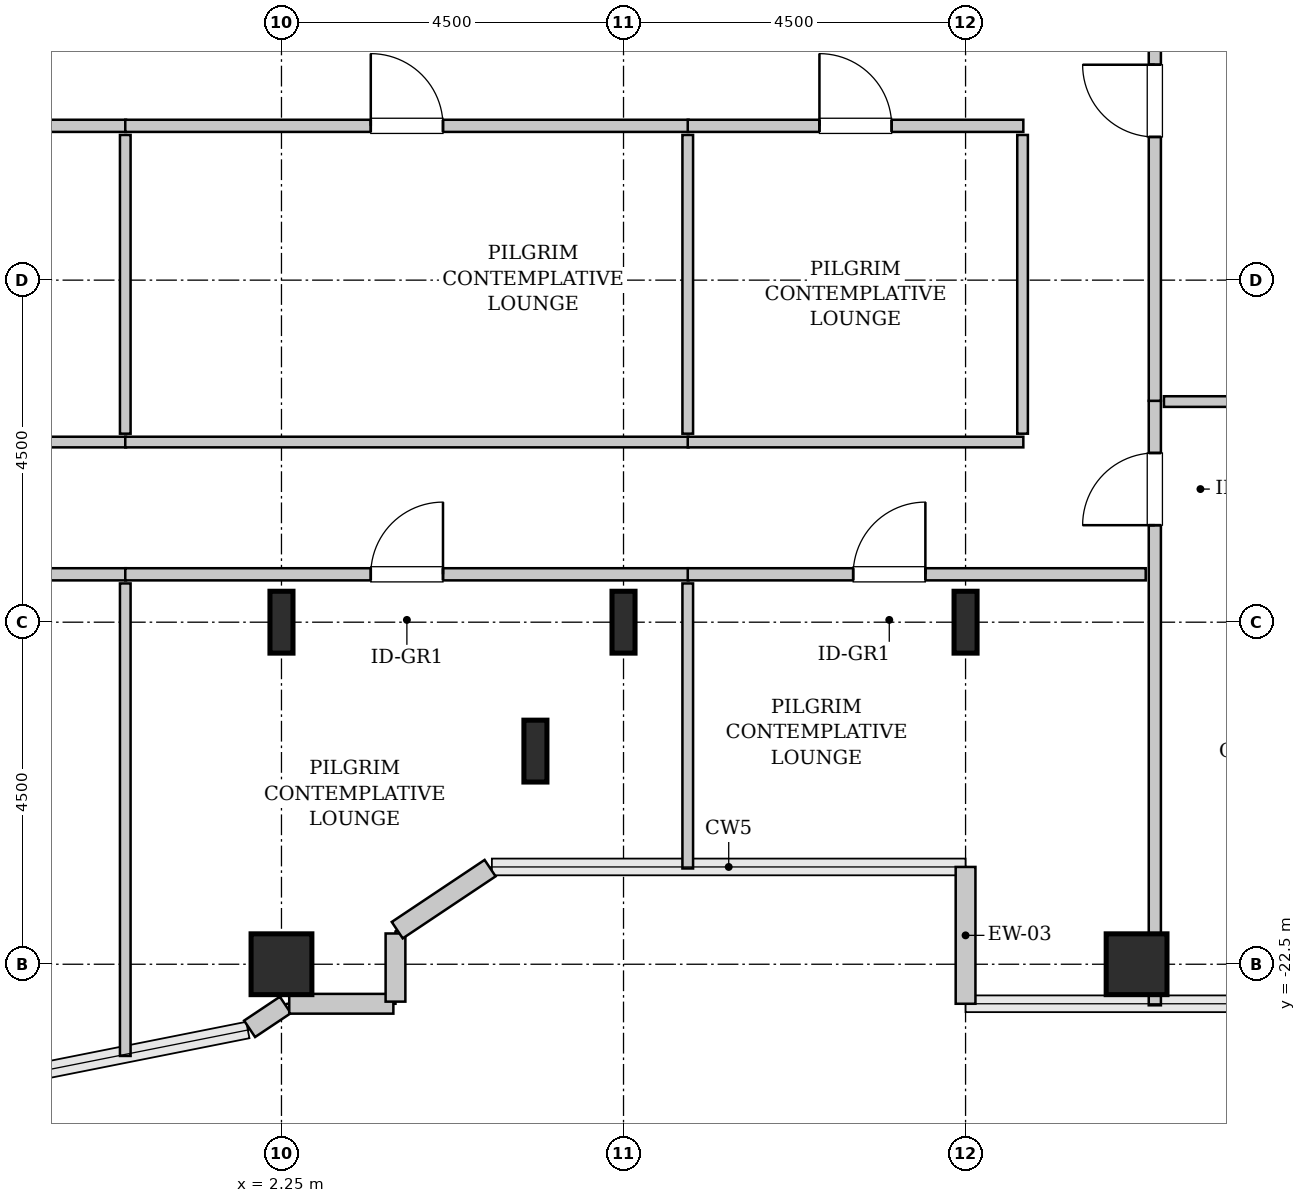
"""IFC4 building model, lengths in metres.
Left out: names, types, materials, properties, quantities, classifications, styles, units other than length and angle.
Written with IfcOpenShell. Run it as: python <this file> out.ifc"""

import sys

from ifc_helpers import new_model, si_unit, direction, frame, frame_2d, origin, origin_2d, place, context, subcontext, project, spatial, rectangle, hollow_rectangle, i_section, extrude, source, transform, mapped, element, fill, save


model = new_model("IFC4")
c1 = context("Model", 3, precision=1e-05, world=origin(), true_north=direction((0.0, 1.0)))
c2 = subcontext(c1, "Body", "Model", "MODEL_VIEW")
j1 = project(units=[si_unit("LENGTHUNIT", "METRE"), si_unit("PLANEANGLEUNIT", "RADIAN")], contexts=[c1])
p1 = place(None, origin())
s1 = spatial("IfcSite", under=j1, at=p1, CompositionType="ELEMENT")
p2 = place(p1, origin())
s2 = spatial("IfcBuilding", under=s1, at=p2, CompositionType="ELEMENT")
p3 = place(p2, frame((0.0, 0.0, 167.8)))
s3 = spatial("IfcBuildingStorey", under=s2, at=p3, CompositionType="ELEMENT", Elevation=167.8)
m1 = source(origin(), c2, "Body", "SweptSolid", [
    extrude(hollow_rectangle(XDim=0.8, YDim=0.8, WallThickness=0.04, InnerFilletRadius=0.04, OuterFilletRadius=0.08, at=origin_2d()), origin(), (0.0, 0.0, 1.0), 3.8),
])
p4 = place(p3, frame((2.25, -22.5, 0.0), z_axis=(0.0, 0.0, 1.0), x_axis=(1.0, 0.0, 0.0)))
e1 = element("IfcColumn", 1, at=p4, inside=s3, PredefinedType="COLUMN", context=c2, shape_type="MappedRepresentation", body=[
    mapped(m1, transform((0.0, 0.0, 0.0), x_axis=(1.0, 0.0, 0.0), y_axis=(0.0, 1.0, 0.0), z_axis=(0.0, 0.0, 1.0), scale=1.0)),
])
m2 = source(origin(), c2, "Body", "SweptSolid", [
    extrude(i_section(OverallWidth=0.303, OverallDepth=0.814, WebThickness=0.021, FlangeThickness=0.04, FilletRadius=0.03, at=origin_2d()), origin(), (0.0, 0.0, 1.0), 3.8),
])
for number, where, z_axis, x_axis in (
    (2, (2.25, -18.0, 0.0), (0.0, 0.0, 1.0), (1.0, 0.0, 0.0)),
    (3, (5.591, -19.696, 0.0), (0.0, 0.0, 1.0), (1.0, 0.0, 0.0)),
    (4, (6.75, -18.0, 0.0), (0.0, 0.0, 1.0), (1.0, 0.0, 0.0)),
    (5, (11.25, -18.0, 0.0), (0.0, 0.0, 1.0), (1.0, 0.0, 0.0)),
):
    element("IfcColumn", number, at=place(p3, frame(where, z_axis=z_axis, x_axis=x_axis)), inside=s3, PredefinedType="COLUMN", context=c2, shape_type="MappedRepresentation", body=[
        mapped(m2, transform((0.0, 0.0, 0.0), x_axis=(1.0, 0.0, 0.0), y_axis=(0.0, 1.0, 0.0), z_axis=(0.0, 0.0, 1.0), scale=1.0)),
    ])
p5 = place(p3, frame((13.5, -22.5, 0.0), z_axis=(0.0, 0.0, 1.0), x_axis=(1.0, 0.0, 0.0)))
e6 = element("IfcColumn", 6, at=p5, inside=s3, PredefinedType="COLUMN", context=c2, shape_type="MappedRepresentation", body=[
    mapped(m1, transform((0.0, 0.0, 0.0), x_axis=(1.0, 0.0, 0.0), y_axis=(0.0, 1.0, 0.0), z_axis=(0.0, 0.0, 1.0), scale=1.0)),
])
m3 = source(origin(), c2, "Body", "SweptSolid", [
    extrude(rectangle(XDim=1.8, YDim=0.26, at=frame_2d((0.9, 0.0))), origin(), (0.0, 0.0, 1.0), 3.55),
])
p6 = place(p3, frame((11.25, -21.22, 0.0), z_axis=(0.0, 0.0, 1.0), x_axis=(0.0, -1.0, 0.0)))
e7 = element("IfcWall", 7, at=p6, inside=s3, PredefinedType="SOLIDWALL", context=c2, shape_type="MappedRepresentation", body=[
    mapped(m3, transform((0.0, 0.0, 0.0), x_axis=(1.0, 0.0, 0.0), y_axis=(0.0, 1.0, 0.0), z_axis=(0.0, 0.0, 1.0), scale=1.0)),
])
m4 = source(origin(), c2, "Body", "SweptSolid", [
    extrude(rectangle(XDim=0.565, YDim=0.26, at=frame_2d((0.283, 0.0))), origin(), (0.0, 0.0, 1.0), 3.55),
])
p7 = place(p3, frame((1.831, -23.35, 0.0), z_axis=(0.0, 0.0, 1.0), x_axis=(0.831651492666, 0.555297933317, 0.0)))
e8 = element("IfcWall", 8, at=p7, inside=s3, PredefinedType="SOLIDWALL", context=c2, shape_type="MappedRepresentation", body=[
    mapped(m4, transform((0.0, 0.0, 0.0), x_axis=(1.0, 0.0, 0.0), y_axis=(0.0, 1.0, 0.0), z_axis=(0.0, 0.0, 1.0), scale=1.0)),
])
m5 = source(origin(), c2, "Body", "SweptSolid", [
    extrude(rectangle(XDim=1.37, YDim=0.26, at=frame_2d((0.685, 0.0))), origin(), (0.0, 0.0, 1.0), 3.55),
])
p8 = place(p3, frame((2.352, -23.02, 0.0), z_axis=(0.0, 0.0, 1.0), x_axis=(1.0, 0.0, 0.0)))
e9 = element("IfcWall", 9, at=p8, inside=s3, PredefinedType="SOLIDWALL", context=c2, shape_type="MappedRepresentation", body=[
    mapped(m5, transform((0.0, 0.0, 0.0), x_axis=(1.0, 0.0, 0.0), y_axis=(0.0, 1.0, 0.0), z_axis=(0.0, 0.0, 1.0), scale=1.0)),
])
m6 = source(origin(), c2, "Body", "SweptSolid", [
    extrude(rectangle(XDim=0.897, YDim=0.26, at=frame_2d((0.448, 0.0))), origin(), (0.0, 0.0, 1.0), 3.55),
])
p9 = place(p3, frame((3.75, -22.992, 0.0), z_axis=(0.0, 0.0, 1.0), x_axis=(0.0, 1.0, 0.0)))
e10 = element("IfcWall", 10, at=p9, inside=s3, PredefinedType="SOLIDWALL", context=c2, shape_type="MappedRepresentation", body=[
    mapped(m6, transform((0.0, 0.0, 0.0), x_axis=(1.0, 0.0, 0.0), y_axis=(0.0, 1.0, 0.0), z_axis=(0.0, 0.0, 1.0), scale=1.0)),
])
m7 = source(origin(), c2, "Body", "SweptSolid", [
    extrude(rectangle(XDim=1.469, YDim=0.26, at=frame_2d((0.734, 0.0))), origin(), (0.0, 0.0, 1.0), 3.55),
])
p10 = place(p3, frame((3.773, -22.052, 0.0), z_axis=(0.0, 0.0, 1.0), x_axis=(0.831461760506, 0.555581983884, 0.0)))
e11 = element("IfcWall", 11, at=p10, inside=s3, PredefinedType="SOLIDWALL", context=c2, shape_type="MappedRepresentation", body=[
    mapped(m7, transform((0.0, 0.0, 0.0), x_axis=(1.0, 0.0, 0.0), y_axis=(0.0, 1.0, 0.0), z_axis=(0.0, 0.0, 1.0), scale=1.0)),
])
m8 = source(origin(), c2, "Body", "SweptSolid", [
    extrude(rectangle(XDim=7.953, YDim=0.16, at=frame_2d((3.976, 0.0))), origin(), (0.0, 0.0, 1.0), 3.535),
])
p11 = place(p3, frame((13.74, -23.04, 0.0), z_axis=(0.0, 0.0, 1.0), x_axis=(0.0, 1.0, 0.0)))
e12 = element("IfcWall", 12, at=p11, inside=s3, PredefinedType="PARTITIONING", context=c2, shape_type="MappedRepresentation", body=[
    mapped(m8, transform((0.0, 0.0, 0.0), x_axis=(1.0, 0.0, 0.0), y_axis=(0.0, 1.0, 0.0), z_axis=(0.0, 0.0, 1.0), scale=1.0)),
])
p12 = place(p11, frame((6.316, 0.0, 0.0)))
e13 = element("IfcOpeningElement", 13, at=p12, cuts=e12, PredefinedType="OPENING", context=c2, shape_type="SweptSolid", body=[
    extrude(rectangle(XDim=0.95, YDim=2.1, at=frame_2d((0.475, 1.05))), frame((0.0, 0.09, 0.0), z_axis=(0.0, -1.0, 0.0), x_axis=(1.0, 0.0, 0.0)), (0.0, 0.0, 1.0), 0.18),
])
m9 = source(origin(), c2, "Body", "SweptSolid", [
    extrude(rectangle(XDim=11.43, YDim=0.14, at=frame_2d((5.715, 0.0))), origin(), (0.0, 0.0, 1.0), 3.535),
])
p13 = place(p3, frame((13.86, -15.097, 0.0), z_axis=(0.0, 0.0, 1.0), x_axis=(1.0, 0.0, 0.0)))
e14 = element("IfcWall", 14, at=p13, inside=s3, PredefinedType="PARTITIONING", context=c2, shape_type="MappedRepresentation", body=[
    mapped(m9, transform((0.0, 0.0, 0.0), x_axis=(1.0, 0.0, 0.0), y_axis=(0.0, 1.0, 0.0), z_axis=(0.0, 0.0, 1.0), scale=1.0)),
])
m10 = source(origin(), c2, "Body", "SweptSolid", [
    extrude(rectangle(XDim=7.892, YDim=0.16, at=frame_2d((3.946, 0.0))), origin(), (0.0, 0.0, 1.0), 3.535),
])
p14 = place(p3, frame((13.74, -15.087, 0.0), z_axis=(0.0, 0.0, 1.0), x_axis=(0.0, 1.0, 0.0)))
e15 = element("IfcWall", 15, at=p14, inside=s3, PredefinedType="PARTITIONING", context=c2, shape_type="MappedRepresentation", body=[
    mapped(m10, transform((0.0, 0.0, 0.0), x_axis=(1.0, 0.0, 0.0), y_axis=(0.0, 1.0, 0.0), z_axis=(0.0, 0.0, 1.0), scale=1.0)),
])
p15 = place(p14, frame((3.471, 0.0, 0.0)))
e16 = element("IfcOpeningElement", 16, at=p15, cuts=e15, PredefinedType="OPENING", context=c2, shape_type="SweptSolid", body=[
    extrude(rectangle(XDim=0.95, YDim=2.1, at=frame_2d((0.475, 1.05))), frame((0.0, 0.09, 0.0), z_axis=(0.0, -1.0, 0.0), x_axis=(1.0, 0.0, 0.0)), (0.0, 0.0, 1.0), 0.18),
])
m11 = source(origin(), c2, "Body", "SweptSolid", [
    extrude(rectangle(XDim=8.81, YDim=0.16, at=frame_2d((4.405, 0.0))), origin(), (0.0, 0.0, 1.0), 3.535),
])
p16 = place(p3, frame((-8.605, -17.37, 0.0), z_axis=(0.0, 0.0, 1.0), x_axis=(1.0, 0.0, 0.0)))
e17 = element("IfcWall", 17, at=p16, inside=s3, PredefinedType="PARTITIONING", context=c2, shape_type="MappedRepresentation", body=[
    mapped(m11, transform((0.0, 0.0, 0.0), x_axis=(1.0, 0.0, 0.0), y_axis=(0.0, 1.0, 0.0), z_axis=(0.0, 0.0, 1.0), scale=1.0)),
])
p17 = place(p16, frame((3.93, 0.0, 0.0)))
e18 = element("IfcOpeningElement", 18, at=p17, cuts=e17, PredefinedType="OPENING", context=c2, shape_type="SweptSolid", body=[
    extrude(rectangle(XDim=0.95, YDim=2.1, at=frame_2d((0.475, 1.05))), frame((0.0, 0.09, 0.0), z_axis=(0.0, -1.0, 0.0), x_axis=(1.0, 0.0, 0.0)), (0.0, 0.0, 1.0), 0.18),
])
m12 = source(origin(), c2, "Body", "SweptSolid", [
    extrude(rectangle(XDim=6.216, YDim=0.14, at=frame_2d((3.108, 0.0))), origin(), (0.0, 0.0, 1.0), 3.535),
])
p18 = place(p3, frame((0.195, -23.706, 0.0), z_axis=(0.0, 0.0, 1.0), x_axis=(0.0, 1.0, 0.0)))
e19 = element("IfcWall", 19, at=p18, inside=s3, PredefinedType="PARTITIONING", context=c2, shape_type="MappedRepresentation", body=[
    mapped(m12, transform((0.0, 0.0, 0.0), x_axis=(1.0, 0.0, 0.0), y_axis=(0.0, 1.0, 0.0), z_axis=(0.0, 0.0, 1.0), scale=1.0)),
])
m13 = source(origin(), c2, "Body", "SweptSolid", [
    extrude(rectangle(XDim=8.7, YDim=0.16, at=frame_2d((4.35, 0.0))), origin(), (0.0, 0.0, 1.0), 3.535),
])
p19 = place(p3, frame((-8.495, -11.47, 0.0), z_axis=(0.0, 0.0, 1.0), x_axis=(1.0, 0.0, 0.0)))
e20 = element("IfcWall", 20, at=p19, inside=s3, PredefinedType="PARTITIONING", context=c2, shape_type="MappedRepresentation", body=[
    mapped(m13, transform((0.0, 0.0, 0.0), x_axis=(1.0, 0.0, 0.0), y_axis=(0.0, 1.0, 0.0), z_axis=(0.0, 0.0, 1.0), scale=1.0)),
])
p20 = place(p19, frame((3.875, 0.0, 0.0)))
e21 = element("IfcOpeningElement", 21, at=p20, cuts=e20, PredefinedType="OPENING", context=c2, shape_type="SweptSolid", body=[
    extrude(rectangle(XDim=0.95, YDim=2.1, at=frame_2d((0.475, 1.05))), frame((0.0, 0.09, 0.0), z_axis=(0.0, -1.0, 0.0), x_axis=(1.0, 0.0, 0.0)), (0.0, 0.0, 1.0), 0.18),
])
m14 = source(origin(), c2, "Body", "SweptSolid", [
    extrude(rectangle(XDim=8.7, YDim=0.14, at=frame_2d((4.35, 0.0))), origin(), (0.0, 0.0, 1.0), 3.535),
])
p21 = place(p3, frame((-8.495, -15.63, 0.0), z_axis=(0.0, 0.0, 1.0), x_axis=(1.0, 0.0, 0.0)))
e22 = element("IfcWall", 22, at=p21, inside=s3, PredefinedType="PARTITIONING", context=c2, shape_type="MappedRepresentation", body=[
    mapped(m14, transform((0.0, 0.0, 0.0), x_axis=(1.0, 0.0, 0.0), y_axis=(0.0, 1.0, 0.0), z_axis=(0.0, 0.0, 1.0), scale=1.0)),
])
m15 = source(origin(), c2, "Body", "SweptSolid", [
    extrude(rectangle(XDim=3.93, YDim=0.14, at=frame_2d((1.965, 0.0))), origin(), (0.0, 0.0, 1.0), 3.535),
])
p22 = place(p3, frame((0.195, -15.52, 0.0), z_axis=(0.0, 0.0, 1.0), x_axis=(0.0, 1.0, 0.0)))
e23 = element("IfcWall", 23, at=p22, inside=s3, PredefinedType="PARTITIONING", context=c2, shape_type="MappedRepresentation", body=[
    mapped(m15, transform((0.0, 0.0, 0.0), x_axis=(1.0, 0.0, 0.0), y_axis=(0.0, 1.0, 0.0), z_axis=(0.0, 0.0, 1.0), scale=1.0)),
])
m16 = source(origin(), c2, "Body", "SweptSolid", [
    extrude(rectangle(XDim=7.41, YDim=0.16, at=frame_2d((3.705, 0.0))), origin(), (0.0, 0.0, 1.0), 3.535),
])
p23 = place(p3, frame((0.195, -17.37, 0.0), z_axis=(0.0, 0.0, 1.0), x_axis=(1.0, 0.0, 0.0)))
e24 = element("IfcWall", 24, at=p23, inside=s3, PredefinedType="PARTITIONING", context=c2, shape_type="MappedRepresentation", body=[
    mapped(m16, transform((0.0, 0.0, 0.0), x_axis=(1.0, 0.0, 0.0), y_axis=(0.0, 1.0, 0.0), z_axis=(0.0, 0.0, 1.0), scale=1.0)),
])
p24 = place(p23, frame((3.23, 0.0, 0.0)))
e25 = element("IfcOpeningElement", 25, at=p24, cuts=e24, PredefinedType="OPENING", context=c2, shape_type="SweptSolid", body=[
    extrude(rectangle(XDim=0.95, YDim=2.1, at=frame_2d((0.475, 1.05))), frame((0.0, 0.09, 0.0), z_axis=(0.0, -1.0, 0.0), x_axis=(1.0, 0.0, 0.0)), (0.0, 0.0, 1.0), 0.18),
])
m17 = source(origin(), c2, "Body", "SweptSolid", [
    extrude(rectangle(XDim=3.75, YDim=0.14, at=frame_2d((1.875, 0.0))), origin(), (0.0, 0.0, 1.0), 3.535),
])
p25 = place(p3, frame((7.595, -21.24, 0.0), z_axis=(0.0, 0.0, 1.0), x_axis=(0.0, 1.0, 0.0)))
e26 = element("IfcWall", 26, at=p25, inside=s3, PredefinedType="PARTITIONING", context=c2, shape_type="MappedRepresentation", body=[
    mapped(m17, transform((0.0, 0.0, 0.0), x_axis=(1.0, 0.0, 0.0), y_axis=(0.0, 1.0, 0.0), z_axis=(0.0, 0.0, 1.0), scale=1.0)),
])
p26 = place(p3, frame((0.195, -11.47, 0.0), z_axis=(0.0, 0.0, 1.0), x_axis=(1.0, 0.0, 0.0)))
e27 = element("IfcWall", 27, at=p26, inside=s3, PredefinedType="PARTITIONING", context=c2, shape_type="MappedRepresentation", body=[
    mapped(m16, transform((0.0, 0.0, 0.0), x_axis=(1.0, 0.0, 0.0), y_axis=(0.0, 1.0, 0.0), z_axis=(0.0, 0.0, 1.0), scale=1.0)),
])
p27 = place(p26, frame((3.23, 0.0, 0.0)))
e28 = element("IfcOpeningElement", 28, at=p27, cuts=e27, PredefinedType="OPENING", context=c2, shape_type="SweptSolid", body=[
    extrude(rectangle(XDim=0.95, YDim=2.1, at=frame_2d((0.475, 1.05))), frame((0.0, 0.09, 0.0), z_axis=(0.0, -1.0, 0.0), x_axis=(1.0, 0.0, 0.0)), (0.0, 0.0, 1.0), 0.18),
])
m18 = source(origin(), c2, "Body", "SweptSolid", [
    extrude(rectangle(XDim=7.41, YDim=0.14, at=frame_2d((3.705, 0.0))), origin(), (0.0, 0.0, 1.0), 3.535),
])
p28 = place(p3, frame((0.195, -15.63, 0.0), z_axis=(0.0, 0.0, 1.0), x_axis=(1.0, 0.0, 0.0)))
e29 = element("IfcWall", 29, at=p28, inside=s3, PredefinedType="PARTITIONING", context=c2, shape_type="MappedRepresentation", body=[
    mapped(m18, transform((0.0, 0.0, 0.0), x_axis=(1.0, 0.0, 0.0), y_axis=(0.0, 1.0, 0.0), z_axis=(0.0, 0.0, 1.0), scale=1.0)),
])
p29 = place(p3, frame((7.595, -15.52, 0.0), z_axis=(0.0, 0.0, 1.0), x_axis=(0.0, 1.0, 0.0)))
e30 = element("IfcWall", 30, at=p29, inside=s3, PredefinedType="PARTITIONING", context=c2, shape_type="MappedRepresentation", body=[
    mapped(m15, transform((0.0, 0.0, 0.0), x_axis=(1.0, 0.0, 0.0), y_axis=(0.0, 1.0, 0.0), z_axis=(0.0, 0.0, 1.0), scale=1.0)),
])
m19 = source(origin(), c2, "Body", "SweptSolid", [
    extrude(rectangle(XDim=6.025, YDim=0.16, at=frame_2d((3.013, 0.0))), origin(), (0.0, 0.0, 1.0), 3.535),
])
p30 = place(p3, frame((7.595, -17.37, 0.0), z_axis=(0.0, 0.0, 1.0), x_axis=(1.0, 0.0, 0.0)))
e31 = element("IfcWall", 31, at=p30, inside=s3, PredefinedType="PARTITIONING", context=c2, shape_type="MappedRepresentation", body=[
    mapped(m19, transform((0.0, 0.0, 0.0), x_axis=(1.0, 0.0, 0.0), y_axis=(0.0, 1.0, 0.0), z_axis=(0.0, 0.0, 1.0), scale=1.0)),
])
p31 = place(p30, frame((2.176, 0.0, 0.0)))
e32 = element("IfcOpeningElement", 32, at=p31, cuts=e31, PredefinedType="OPENING", context=c2, shape_type="SweptSolid", body=[
    extrude(rectangle(XDim=0.95, YDim=2.1, at=frame_2d((0.475, 1.05))), frame((0.0, 0.09, 0.0), z_axis=(0.0, -1.0, 0.0), x_axis=(1.0, 0.0, 0.0)), (0.0, 0.0, 1.0), 0.18),
])
m20 = source(origin(), c2, "Body", "SweptSolid", [
    extrude(rectangle(XDim=4.415, YDim=0.16, at=frame_2d((2.208, 0.0))), origin(), (0.0, 0.0, 1.0), 3.535),
])
p32 = place(p3, frame((7.595, -11.47, 0.0), z_axis=(0.0, 0.0, 1.0), x_axis=(1.0, 0.0, 0.0)))
e33 = element("IfcWall", 33, at=p32, inside=s3, PredefinedType="PARTITIONING", context=c2, shape_type="MappedRepresentation", body=[
    mapped(m20, transform((0.0, 0.0, 0.0), x_axis=(1.0, 0.0, 0.0), y_axis=(0.0, 1.0, 0.0), z_axis=(0.0, 0.0, 1.0), scale=1.0)),
])
p33 = place(p32, frame((1.732, 0.0, 0.0)))
e34 = element("IfcOpeningElement", 34, at=p33, cuts=e33, PredefinedType="OPENING", context=c2, shape_type="SweptSolid", body=[
    extrude(rectangle(XDim=0.95, YDim=2.1, at=frame_2d((0.475, 1.05))), frame((0.0, 0.09, 0.0), z_axis=(0.0, -1.0, 0.0), x_axis=(1.0, 0.0, 0.0)), (0.0, 0.0, 1.0), 0.18),
])
m21 = source(origin(), c2, "Body", "SweptSolid", [
    extrude(rectangle(XDim=4.415, YDim=0.14, at=frame_2d((2.208, 0.0))), origin(), (0.0, 0.0, 1.0), 3.535),
])
p34 = place(p3, frame((7.595, -15.63, 0.0), z_axis=(0.0, 0.0, 1.0), x_axis=(1.0, 0.0, 0.0)))
e35 = element("IfcWall", 35, at=p34, inside=s3, PredefinedType="PARTITIONING", context=c2, shape_type="MappedRepresentation", body=[
    mapped(m21, transform((0.0, 0.0, 0.0), x_axis=(1.0, 0.0, 0.0), y_axis=(0.0, 1.0, 0.0), z_axis=(0.0, 0.0, 1.0), scale=1.0)),
])
p35 = place(p3, frame((12.0, -15.52, 0.0), z_axis=(0.0, 0.0, 1.0), x_axis=(0.0, 1.0, 0.0)))
e36 = element("IfcWall", 36, at=p35, inside=s3, PredefinedType="PARTITIONING", context=c2, shape_type="MappedRepresentation", body=[
    mapped(m15, transform((0.0, 0.0, 0.0), x_axis=(1.0, 0.0, 0.0), y_axis=(0.0, 1.0, 0.0), z_axis=(0.0, 0.0, 1.0), scale=1.0)),
])
m22 = source(origin(), c2, "Body", "SweptSolid", [
    extrude(rectangle(XDim=0.95, YDim=2.1, at=frame_2d((0.475, 1.05))), frame((0.0, 0.025, 0.0), z_axis=(0.0, -1.0, 0.0), x_axis=(1.0, 0.0, 0.0)), (0.0, 0.0, 1.0), 0.05),
])
p36 = place(p12, origin())
e37 = element("IfcDoor", 37, at=p36, inside=s3, OperationType="SINGLE_SWING_LEFT", PredefinedType="DOOR", context=c2, shape_type="MappedRepresentation", body=[
    mapped(m22, transform((0.0, 0.0, 0.0), x_axis=(1.0, 0.0, 0.0), y_axis=(0.0, 1.0, 0.0), z_axis=(0.0, 0.0, 1.0), scale=1.0)),
])
fill(e13, e37)
p37 = place(p15, origin())
e38 = element("IfcDoor", 38, at=p37, inside=s3, OperationType="SINGLE_SWING_RIGHT", PredefinedType="DOOR", context=c2, shape_type="MappedRepresentation", body=[
    mapped(m22, transform((0.0, 0.0, 0.0), x_axis=(1.0, 0.0, 0.0), y_axis=(0.0, 1.0, 0.0), z_axis=(0.0, 0.0, 1.0), scale=1.0)),
])
fill(e16, e38)
p38 = place(p24, origin())
e39 = element("IfcDoor", 39, at=p38, inside=s3, OperationType="SINGLE_SWING_RIGHT", PredefinedType="DOOR", context=c2, shape_type="MappedRepresentation", body=[
    mapped(m22, transform((0.0, 0.0, 0.0), x_axis=(1.0, 0.0, 0.0), y_axis=(0.0, 1.0, 0.0), z_axis=(0.0, 0.0, 1.0), scale=1.0)),
])
fill(e25, e39)
p39 = place(p27, origin())
e40 = element("IfcDoor", 40, at=p39, inside=s3, OperationType="SINGLE_SWING_LEFT", PredefinedType="DOOR", context=c2, shape_type="MappedRepresentation", body=[
    mapped(m22, transform((0.0, 0.0, 0.0), x_axis=(1.0, 0.0, 0.0), y_axis=(0.0, 1.0, 0.0), z_axis=(0.0, 0.0, 1.0), scale=1.0)),
])
fill(e28, e40)
p40 = place(p31, origin())
e41 = element("IfcDoor", 41, at=p40, inside=s3, OperationType="SINGLE_SWING_RIGHT", PredefinedType="DOOR", context=c2, shape_type="MappedRepresentation", body=[
    mapped(m22, transform((0.0, 0.0, 0.0), x_axis=(1.0, 0.0, 0.0), y_axis=(0.0, 1.0, 0.0), z_axis=(0.0, 0.0, 1.0), scale=1.0)),
])
fill(e32, e41)
p41 = place(p33, origin())
e42 = element("IfcDoor", 42, at=p41, inside=s3, OperationType="SINGLE_SWING_LEFT", PredefinedType="DOOR", context=c2, shape_type="MappedRepresentation", body=[
    mapped(m22, transform((0.0, 0.0, 0.0), x_axis=(1.0, 0.0, 0.0), y_axis=(0.0, 1.0, 0.0), z_axis=(0.0, 0.0, 1.0), scale=1.0)),
])
fill(e34, e42)
save(model, sys.argv[1])
